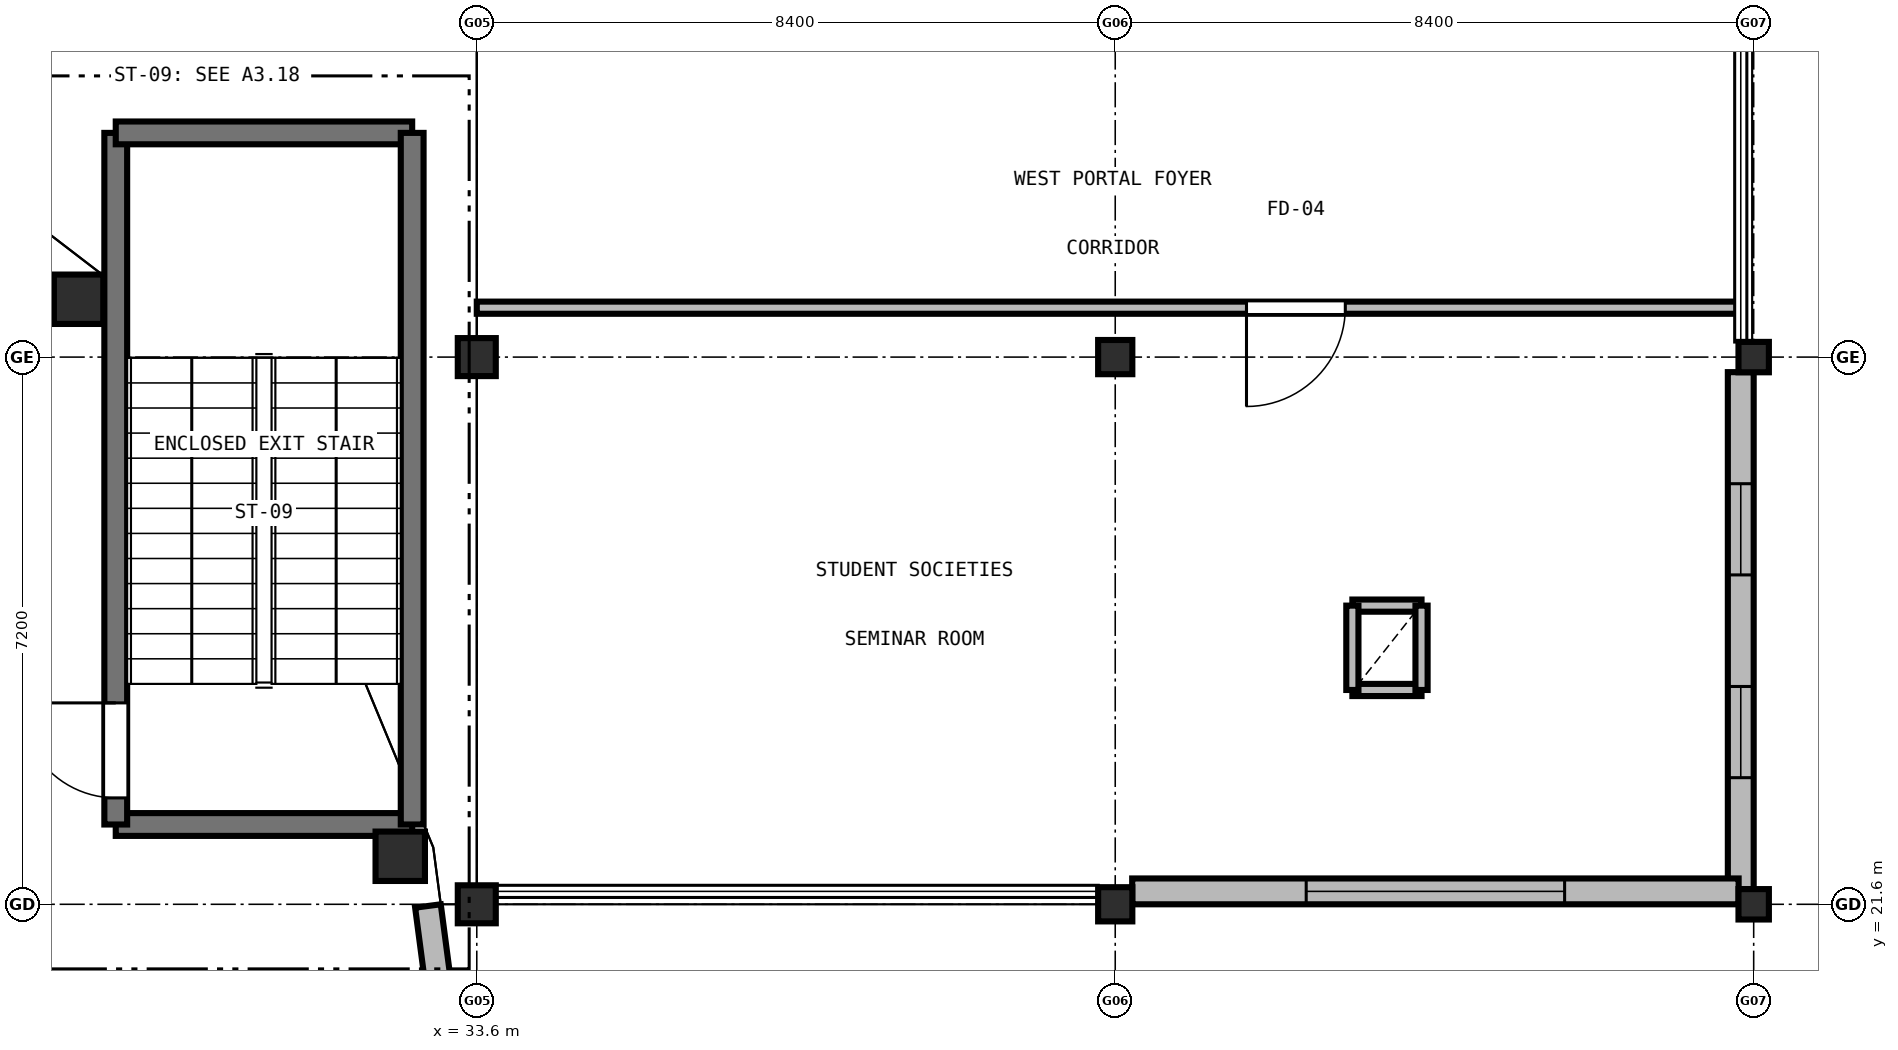
"""IFC4 building model, lengths in metres.
Left out: names, types, materials, properties, quantities, classifications, styles, units other than length and angle.
Written with IfcOpenShell. Run it as: python <this file> out.ifc"""

import sys

from ifc_helpers import new_model, si_unit, direction, frame, frame_2d, origin, origin_2d, place, context, subcontext, project, spatial, rectangle, circle, extrude, element, fill, save


model = new_model("IFC4")
c1 = context("Model", 3, precision=1e-05, world=origin(), true_north=direction((0.0, 1.0)))
c2 = subcontext(c1, "Body", "Model", "MODEL_VIEW")
j1 = project(units=[si_unit("LENGTHUNIT", "METRE"), si_unit("PLANEANGLEUNIT", "RADIAN")], contexts=[c1])
p1 = place(None, origin())
s1 = spatial("IfcSite", under=j1, at=p1, CompositionType="ELEMENT")
p2 = place(p1, origin())
s2 = spatial("IfcBuilding", under=s1, at=p2, CompositionType="ELEMENT")
p3 = place(p2, frame((0.0, 0.0, 5.1)))
s3 = spatial("IfcBuildingStorey", under=s2, at=p3, CompositionType="ELEMENT", Elevation=5.1)
for number, where, z_axis, x_axis in (
    (1, (28.361, 29.561, 0.0), (0.0, 0.0, 1.0), (1.0, 0.0, 0.0)),
    (2, (32.593, 22.232, 0.0), (0.0, 0.0, 1.0), (1.0, 0.0, 0.0)),
):
    element("IfcColumn", number, at=place(p3, frame(where, z_axis=z_axis, x_axis=x_axis)), inside=s3, PredefinedType="COLUMN", context=c2, shape_type="SweptSolid", body=[
        extrude(circle(Radius=0.325, at=origin_2d()), origin(), (0.0, 0.0, 1.0), 4.2),
    ])
for number, where, z_axis, x_axis in (
    (3, (33.6, 21.6, 0.0), (0.0, 0.0, 1.0), (1.0, 0.0, 0.0)),
    (4, (33.6, 28.8, 0.0), (0.0, 0.0, 1.0), (1.0, 0.0, 0.0)),
):
    element("IfcColumn", number, at=place(p3, frame(where, z_axis=z_axis, x_axis=x_axis)), inside=s3, PredefinedType="COLUMN", context=c2, shape_type="SweptSolid", body=[
        extrude(rectangle(XDim=0.5, YDim=0.5, at=origin_2d()), origin(), (0.0, 0.0, 1.0), 4.2),
    ])
for number, where, z_axis, x_axis in (
    (5, (42.0, 21.6, 0.0), (0.0, 0.0, 1.0), (1.0, 0.0, 0.0)),
    (6, (42.0, 28.8, 0.0), (0.0, 0.0, 1.0), (1.0, 0.0, 0.0)),
):
    element("IfcColumn", number, at=place(p3, frame(where, z_axis=z_axis, x_axis=x_axis)), inside=s3, PredefinedType="COLUMN", context=c2, shape_type="SweptSolid", body=[
        extrude(rectangle(XDim=0.45, YDim=0.45, at=origin_2d()), origin(), (0.0, 0.0, 1.0), 4.2),
    ])
for number, where, z_axis, x_axis in (
    (7, (50.4, 21.6, 0.0), (0.0, 0.0, 1.0), (1.0, 0.0, 0.0)),
    (8, (50.4, 28.8, 0.0), (0.0, 0.0, 1.0), (1.0, 0.0, 0.0)),
):
    element("IfcColumn", number, at=place(p3, frame(where, z_axis=z_axis, x_axis=x_axis)), inside=s3, PredefinedType="COLUMN", context=c2, shape_type="SweptSolid", body=[
        extrude(rectangle(XDim=0.4, YDim=0.4, at=origin_2d()), origin(), (0.0, 0.0, 1.0), 4.2),
    ])
p4 = place(p3, frame((50.23, 28.602, 0.0), z_axis=(0.0, 0.0, 1.0), x_axis=(0.0, -1.0, 0.0)))
e9 = element("IfcWall", 9, at=p4, inside=s3, PredefinedType="SOLIDWALL", context=c2, shape_type="SweptSolid", body=[
    extrude(rectangle(XDim=6.804, YDim=0.34, at=frame_2d((3.402, 0.0))), origin(), (0.0, 0.0, 1.0), 3.31),
])
p5 = place(p4, frame((1.468, 0.0, 0.95)))
e10 = element("IfcOpeningElement", 10, at=p5, cuts=e9, PredefinedType="OPENING", context=c2, shape_type="SweptSolid", body=[
    extrude(rectangle(XDim=1.2, YDim=1.4, at=frame_2d((0.6, 0.7))), frame((0.0, 0.18, 0.0), z_axis=(0.0, -1.0, 0.0), x_axis=(1.0, 0.0, 0.0)), (0.0, 0.0, 1.0), 0.36),
])
p6 = place(p4, frame((4.136, 0.0, 0.95)))
e11 = element("IfcOpeningElement", 11, at=p6, cuts=e9, PredefinedType="OPENING", context=c2, shape_type="SweptSolid", body=[
    extrude(rectangle(XDim=1.2, YDim=1.4, at=frame_2d((0.6, 0.7))), frame((0.0, 0.18, 0.0), z_axis=(0.0, -1.0, 0.0), x_axis=(1.0, 0.0, 0.0)), (0.0, 0.0, 1.0), 0.36),
])
p7 = place(p3, frame((50.202, 21.77, 0.0), z_axis=(0.0, 0.0, 1.0), x_axis=(-1.0, 0.0, 0.0)))
e12 = element("IfcWall", 12, at=p7, inside=s3, PredefinedType="SOLIDWALL", context=c2, shape_type="SweptSolid", body=[
    extrude(rectangle(XDim=7.979, YDim=0.34, at=frame_2d((3.99, 0.0))), origin(), (0.0, 0.0, 1.0), 3.11),
])
p8 = place(p7, frame((2.29, 0.0, 0.95)))
e13 = element("IfcOpeningElement", 13, at=p8, cuts=e12, PredefinedType="OPENING", context=c2, shape_type="SweptSolid", body=[
    extrude(rectangle(XDim=3.4, YDim=1.8, at=frame_2d((1.7, 0.9))), frame((0.0, 0.18, 0.0), z_axis=(0.0, -1.0, 0.0), x_axis=(1.0, 0.0, 0.0)), (0.0, 0.0, 1.0), 0.36),
])
p9 = place(p3, frame((32.958, 21.578, 0.0), z_axis=(0.0, 0.0, 1.0), x_axis=(0.130503210904, -0.991447886651, 0.0)))
e14 = element("IfcWall", 14, at=p9, inside=s3, PredefinedType="SOLIDWALL", context=c2, shape_type="SweptSolid", body=[
    extrude(rectangle(XDim=3.631, YDim=0.34, at=frame_2d((1.815, 0.0))), origin(), (0.0, 0.0, 1.0), 2.96),
])
p10 = place(p9, frame((0.916, 0.0, 1.0)))
e15 = element("IfcOpeningElement", 15, at=p10, cuts=e14, PredefinedType="OPENING", context=c2, shape_type="SweptSolid", body=[
    extrude(rectangle(XDim=1.8, YDim=1.8, at=frame_2d((0.9, 0.9))), frame((0.0, 0.18, 0.0), z_axis=(0.0, -1.0, 0.0), x_axis=(1.0, 0.0, 0.0)), (0.0, 0.0, 1.0), 0.36),
])
p11 = place(p3, frame((32.75, 22.65, 0.0), z_axis=(0.0, 0.0, 1.0), x_axis=(-1.0, 0.0, 0.0)))
e16 = element("IfcWall", 16, at=p11, inside=s3, PredefinedType="SHEAR", context=c2, shape_type="SweptSolid", body=[
    extrude(rectangle(XDim=3.9, YDim=0.3, at=frame_2d((1.95, 0.0))), origin(), (0.0, 0.0, 1.0), 3.92),
])
p12 = place(p3, frame((28.85, 22.65, 0.0), z_axis=(0.0, 0.0, 1.0), x_axis=(0.0, 1.0, 0.0)))
e17 = element("IfcWall", 17, at=p12, inside=s3, PredefinedType="SHEAR", context=c2, shape_type="SweptSolid", body=[
    extrude(rectangle(XDim=9.1, YDim=0.3, at=frame_2d((4.55, 0.0))), origin(), (0.0, 0.0, 1.0), 3.92),
])
p13 = place(p12, frame((0.35, 0.0, 0.0)))
e18 = element("IfcOpeningElement", 18, at=p13, cuts=e17, PredefinedType="OPENING", context=c2, shape_type="SweptSolid", body=[
    extrude(rectangle(XDim=1.25, YDim=2.2, at=frame_2d((0.625, 1.1))), frame((0.0, 0.16, 0.0), z_axis=(0.0, -1.0, 0.0), x_axis=(1.0, 0.0, 0.0)), (0.0, 0.0, 1.0), 0.32),
])
p14 = place(p3, frame((28.85, 31.75, 0.0), z_axis=(0.0, 0.0, 1.0), x_axis=(1.0, 0.0, 0.0)))
e19 = element("IfcWall", 19, at=p14, inside=s3, PredefinedType="SHEAR", context=c2, shape_type="SweptSolid", body=[
    extrude(rectangle(XDim=3.9, YDim=0.3, at=frame_2d((1.95, 0.0))), origin(), (0.0, 0.0, 1.0), 3.92),
])
p15 = place(p3, frame((32.75, 31.75, 0.0), z_axis=(0.0, 0.0, 1.0), x_axis=(0.0, -1.0, 0.0)))
e20 = element("IfcWall", 20, at=p15, inside=s3, PredefinedType="SHEAR", context=c2, shape_type="SweptSolid", body=[
    extrude(rectangle(XDim=9.1, YDim=0.3, at=frame_2d((4.55, 0.0))), origin(), (0.0, 0.0, 1.0), 3.92),
])
for number, where, z_axis, x_axis in (
    (21, (45.12, 24.42, 0.0), (0.0, 0.0, 1.0), (1.0, 0.0, 0.0)),
    (22, (46.03, 25.53, 0.0), (0.0, 0.0, 1.0), (-1.0, 0.0, 0.0)),
):
    element("IfcWall", number, at=place(p3, frame(where, z_axis=z_axis, x_axis=x_axis)), inside=s3, PredefinedType="PARTITIONING", context=c2, shape_type="SweptSolid", body=[
        extrude(rectangle(XDim=0.91, YDim=0.16, at=frame_2d((0.455, 0.0))), origin(), (0.0, 0.0, 1.0), 3.455),
    ])
p16 = place(p3, frame((45.12, 25.53, 0.0), z_axis=(0.0, 0.0, 1.0), x_axis=(0.0, -1.0, 0.0)))
e23 = element("IfcWall", 23, at=p16, inside=s3, PredefinedType="PARTITIONING", context=c2, shape_type="SweptSolid", body=[
    extrude(rectangle(XDim=1.11, YDim=0.16, at=frame_2d((0.555, 0.0))), origin(), (0.0, 0.0, 1.0), 3.65),
])
p17 = place(p3, frame((46.03, 24.42, 0.0), z_axis=(0.0, 0.0, 1.0), x_axis=(0.0, 1.0, 0.0)))
e24 = element("IfcWall", 24, at=p17, inside=s3, PredefinedType="PARTITIONING", context=c2, shape_type="SweptSolid", body=[
    extrude(rectangle(XDim=1.11, YDim=0.16, at=frame_2d((0.555, 0.0))), origin(), (0.0, 0.0, 1.0), 3.455),
])
p18 = place(p3, frame((50.18, 29.45, 0.0), z_axis=(0.0, 0.0, 1.0), x_axis=(-1.0, 0.0, 0.0)))
e25 = element("IfcWall", 25, at=p18, inside=s3, PredefinedType="PARTITIONING", context=c2, shape_type="SweptSolid", body=[
    extrude(rectangle(XDim=16.58, YDim=0.16, at=frame_2d((8.29, 0.0))), origin(), (0.0, 0.0, 1.0), 3.305),
])
p19 = place(p18, frame((5.153, 0.0, 0.0)))
e26 = element("IfcOpeningElement", 26, at=p19, cuts=e25, PredefinedType="OPENING", context=c2, shape_type="SweptSolid", body=[
    extrude(rectangle(XDim=1.3, YDim=2.15, at=frame_2d((0.65, 1.075))), frame((0.0, 0.09, 0.0), z_axis=(0.0, -1.0, 0.0), x_axis=(1.0, 0.0, 0.0)), (0.0, 0.0, 1.0), 0.18),
])
p20 = place(p5, origin())
e27 = element("IfcWindow", 27, at=p20, inside=s3, PartitioningType="SINGLE_PANEL", PredefinedType="WINDOW", context=c2, shape_type="SweptSolid", body=[
    extrude(rectangle(XDim=1.2, YDim=1.4, at=frame_2d((0.6, 0.7))), frame((0.0, 0.03, 0.0), z_axis=(0.0, -1.0, 0.0), x_axis=(1.0, 0.0, 0.0)), (0.0, 0.0, 1.0), 0.06),
])
fill(e10, e27)
p21 = place(p6, origin())
e28 = element("IfcWindow", 28, at=p21, inside=s3, PartitioningType="SINGLE_PANEL", PredefinedType="WINDOW", context=c2, shape_type="SweptSolid", body=[
    extrude(rectangle(XDim=1.2, YDim=1.4, at=frame_2d((0.6, 0.7))), frame((0.0, 0.03, 0.0), z_axis=(0.0, -1.0, 0.0), x_axis=(1.0, 0.0, 0.0)), (0.0, 0.0, 1.0), 0.06),
])
fill(e11, e28)
p22 = place(p8, origin())
e29 = element("IfcWindow", 29, at=p22, inside=s3, PartitioningType="SINGLE_PANEL", PredefinedType="WINDOW", context=c2, shape_type="SweptSolid", body=[
    extrude(rectangle(XDim=3.4, YDim=1.8, at=frame_2d((1.7, 0.9))), frame((0.0, 0.03, 0.0), z_axis=(0.0, -1.0, 0.0), x_axis=(1.0, 0.0, 0.0)), (0.0, 0.0, 1.0), 0.06),
])
fill(e13, e29)
p23 = place(p13, origin())
e30 = element("IfcDoor", 30, at=p23, inside=s3, OperationType="SINGLE_SWING_RIGHT", PredefinedType="DOOR", context=c2, shape_type="SweptSolid", body=[
    extrude(rectangle(XDim=1.25, YDim=2.2, at=frame_2d((0.625, 1.1))), frame((0.0, 0.025, 0.0), z_axis=(0.0, -1.0, 0.0), x_axis=(1.0, 0.0, 0.0)), (0.0, 0.0, 1.0), 0.05),
])
fill(e18, e30)
p24 = place(p19, origin())
e31 = element("IfcDoor", 31, at=p24, inside=s3, OperationType="SINGLE_SWING_RIGHT", PredefinedType="DOOR", context=c2, shape_type="SweptSolid", body=[
    extrude(rectangle(XDim=1.3, YDim=2.15, at=frame_2d((0.65, 1.075))), frame((0.0, 0.025, 0.0), z_axis=(0.0, -1.0, 0.0), x_axis=(1.0, 0.0, 0.0)), (0.0, 0.0, 1.0), 0.05),
])
fill(e26, e31)
save(model, sys.argv[1])
